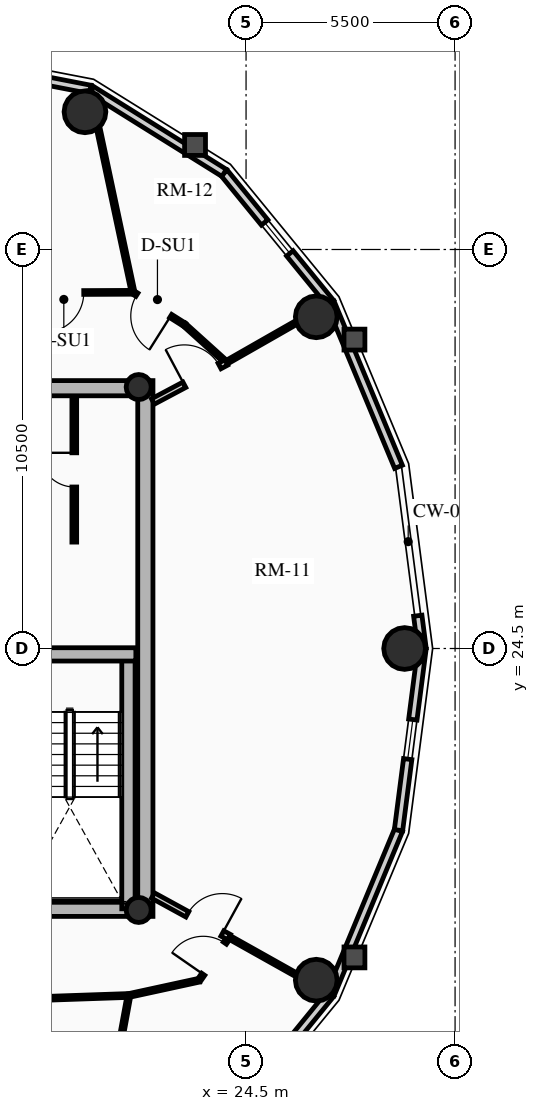
"""IFC4 building model, lengths in metres.
Left out: names, types, materials, properties, quantities, classifications, styles, units other than length and angle.
Written with IfcOpenShell. Run it as: python <this file> out.ifc"""

import sys

from ifc_helpers import new_model, si_unit, direction, frame, frame_2d, origin, origin_2d, place, context, subcontext, project, spatial, rectangle, circle, hollow_circle, extrude, source, transform, mapped, element, fill, save


model = new_model("IFC4")
c1 = context("Model", 3, precision=1e-05, world=origin(), true_north=direction((0.0, 1.0)))
c2 = subcontext(c1, "Body", "Model", "MODEL_VIEW")
j1 = project(units=[si_unit("LENGTHUNIT", "METRE"), si_unit("PLANEANGLEUNIT", "RADIAN")], contexts=[c1])
p1 = place(None, origin())
s1 = spatial("IfcSite", under=j1, at=p1, CompositionType="ELEMENT")
p2 = place(p1, origin())
s2 = spatial("IfcBuilding", under=s1, at=p2, CompositionType="ELEMENT")
p3 = place(p2, frame((0.0, 0.0, 229.25)))
s3 = spatial("IfcBuildingStorey", under=s2, at=p3, CompositionType="ELEMENT", Elevation=229.25)
p4 = place(p3, frame((21.85, 17.45, 0.0), z_axis=(0.0, 0.0, 1.0), x_axis=(0.0, 1.0, 0.0)))
e1 = element("IfcWall", 1, at=p4, inside=s3, PredefinedType="SHEAR", context=c2, shape_type="SweptSolid", body=[
    extrude(rectangle(XDim=14.1, YDim=0.4, at=frame_2d((7.05, 0.0))), origin(), (0.0, 0.0, 1.0), 3.2),
])
p5 = place(p3, frame((11.15, 17.65, 0.0), z_axis=(0.0, 0.0, 1.0), x_axis=(1.0, 0.0, 0.0)))
e2 = element("IfcWall", 2, at=p5, inside=s3, PredefinedType="SHEAR", context=c2, shape_type="SweptSolid", body=[
    extrude(rectangle(XDim=10.7, YDim=0.4, at=frame_2d((5.35, 0.0))), origin(), (0.0, 0.0, 1.0), 3.2),
])
m1 = source(origin(), c2, "Body", "SweptSolid", [
    extrude(rectangle(XDim=1.5, YDim=2.02, at=frame_2d((0.75, 1.01))), frame((0.0, 0.21, 0.0), z_axis=(0.0, -1.0, 0.0), x_axis=(1.0, 0.0, 0.0)), (0.0, 0.0, 1.0), 0.42),
])
p6 = place(p5, frame((5.45, 0.0, 0.0)))
e3 = element("IfcOpeningElement", 3, at=p6, cuts=e2, PredefinedType="OPENING", context=c2, shape_type="MappedRepresentation", body=[
    mapped(m1, transform((0.0, 0.0, 0.0), x_axis=(1.0, 0.0, 0.0), y_axis=(0.0, 1.0, 0.0), z_axis=(0.0, 0.0, 1.0), scale=1.0)),
])
p7 = place(p3, frame((11.15, 31.35, 0.0), z_axis=(0.0, 0.0, 1.0), x_axis=(1.0, 0.0, 0.0)))
e4 = element("IfcWall", 4, at=p7, inside=s3, PredefinedType="SHEAR", context=c2, shape_type="SweptSolid", body=[
    extrude(rectangle(XDim=10.7, YDim=0.4, at=frame_2d((5.35, 0.0))), origin(), (0.0, 0.0, 1.0), 3.2),
])
p8 = place(p7, frame((4.6, 0.0, 0.0)))
e5 = element("IfcOpeningElement", 5, at=p8, cuts=e4, PredefinedType="OPENING", context=c2, shape_type="MappedRepresentation", body=[
    mapped(m1, transform((0.0, 0.0, 0.0), x_axis=(1.0, 0.0, 0.0), y_axis=(0.0, 1.0, 0.0), z_axis=(0.0, 0.0, 1.0), scale=1.0)),
])
p9 = place(p3, frame((21.405, 17.65, 0.0), z_axis=(0.0, 0.0, 1.0), x_axis=(0.0, 1.0, 0.0)))
e6 = element("IfcWall", 6, at=p9, inside=s3, PredefinedType="SHEAR", context=c2, shape_type="SweptSolid", body=[
    extrude(rectangle(XDim=6.695, YDim=0.35, at=frame_2d((3.348, 0.0))), origin(), (0.0, 0.0, 1.0), 3.2),
])
p10 = place(p3, frame((18.315, 24.345, 0.0), z_axis=(0.0, 0.0, 1.0), x_axis=(1.0, 0.0, 0.0)))
e7 = element("IfcWall", 7, at=p10, inside=s3, PredefinedType="SHEAR", context=c2, shape_type="SweptSolid", body=[
    extrude(rectangle(XDim=3.285, YDim=0.35, at=frame_2d((1.643, 0.0))), origin(), (0.0, 0.0, 1.0), 3.2),
])
for number, where, z_axis, x_axis in (
    (8, (21.675, 17.62, 0.0), (0.0, 0.0, 1.0), (1.0, 0.0, 0.0)),
    (9, (21.675, 31.38, 0.0), (0.0, 0.0, 1.0), (1.0, 0.0, 0.0)),
):
    element("IfcColumn", number, at=place(p3, frame(where, z_axis=z_axis, x_axis=x_axis)), inside=s3, PredefinedType="COLUMN", context=c2, shape_type="SweptSolid", body=[
        extrude(hollow_circle(Radius=0.33, WallThickness=0.025, at=origin_2d()), origin(), (0.0, 0.0, 1.0), 3.2),
    ])
for number, where, z_axis, x_axis in (
    (10, (28.672, 24.5, 0.0), (0.0, 0.0, 1.0), (1.0, 0.0, 0.0)),
    (11, (26.347, 33.229, 0.0), (0.0, 0.0, 1.0), (1.0, 0.0, 0.0)),
    (12, (20.261, 38.623, 0.0), (0.0, 0.0, 1.0), (1.0, 0.0, 0.0)),
    (13, (26.347, 15.771, 0.0), (0.0, 0.0, 1.0), (1.0, 0.0, 0.0)),
):
    element("IfcColumn", number, at=place(p3, frame(where, z_axis=z_axis, x_axis=x_axis)), inside=s3, PredefinedType="USERDEFINED", context=c2, shape_type="SweptSolid", body=[
        extrude(circle(Radius=0.55, at=origin_2d()), origin(), (0.0, 0.0, 1.0), 3.2),
    ])
p11 = place(p3, frame((29.018, 25.363, 0.0), z_axis=(0.0, 0.0, 1.0), x_axis=(0.128247365719, -0.991742211054, 0.0)))
e14 = element("IfcWall", 14, at=p11, inside=s3, PredefinedType="SOLIDWALL", context=c2, shape_type="SweptSolid", body=[
    extrude(rectangle(XDim=0.87, YDim=0.22, at=frame_2d((0.435, 0.0))), origin(), (0.0, 0.0, 1.0), 2.612),
])
p12 = place(p3, frame((26.718, 33.593, 0.0), z_axis=(0.0, 0.0, 1.0), x_axis=(0.384036305194, -0.923317993052, 0.0)))
e15 = element("IfcWall", 15, at=p12, inside=s3, PredefinedType="SOLIDWALL", context=c2, shape_type="SweptSolid", body=[
    extrude(rectangle(XDim=4.671, YDim=0.22, at=frame_2d((2.335, 0.0))), origin(), (0.0, 0.0, 1.0), 2.612),
])
p13 = place(p3, frame((23.924, 37.015, 0.0), z_axis=(0.0, 0.0, 1.0), x_axis=(0.632467166636, -0.774587169483, 0.0)))
e16 = element("IfcWall", 16, at=p13, inside=s3, PredefinedType="SOLIDWALL", context=c2, shape_type="SweptSolid", body=[
    extrude(rectangle(XDim=4.418, YDim=0.22, at=frame_2d((2.209, 0.0))), origin(), (0.0, 0.0, 1.0), 2.612),
])
m2 = source(origin(), c2, "Body", "SweptSolid", [
    extrude(rectangle(XDim=1.05, YDim=1.3, at=frame_2d((0.525, 0.65))), frame((0.0, 0.12, 0.0), z_axis=(0.0, -1.0, 0.0), x_axis=(1.0, 0.0, 0.0)), (0.0, 0.0, 1.0), 0.24),
])
p14 = place(p13, frame((1.684, 0.0, 0.65)))
e17 = element("IfcOpeningElement", 17, at=p14, cuts=e16, PredefinedType="OPENING", context=c2, shape_type="MappedRepresentation", body=[
    mapped(m2, transform((0.0, 0.0, 0.0), x_axis=(1.0, 0.0, 0.0), y_axis=(0.0, 1.0, 0.0), z_axis=(0.0, 0.0, 1.0), scale=1.0)),
])
p15 = place(p3, frame((20.403, 39.213, 0.0), z_axis=(0.0, 0.0, 1.0), x_axis=(0.848318713376, -0.529485939886, 0.0)))
e18 = element("IfcWall", 18, at=p15, inside=s3, PredefinedType="SOLIDWALL", context=c2, shape_type="SweptSolid", body=[
    extrude(rectangle(XDim=4.15, YDim=0.22, at=frame_2d((2.075, 0.0))), origin(), (0.0, 0.0, 1.0), 2.612),
])
p16 = place(p3, frame((16.5, 39.97, 0.0), z_axis=(0.0, 0.0, 1.0), x_axis=(0.981700307484, -0.190432419211, 0.0)))
e19 = element("IfcWall", 19, at=p16, inside=s3, PredefinedType="SOLIDWALL", context=c2, shape_type="SweptSolid", body=[
    extrude(rectangle(XDim=3.976, YDim=0.22, at=frame_2d((1.988, 0.0))), origin(), (0.0, 0.0, 1.0), 2.612),
])
p17 = place(p16, frame((1.463, 0.0, 0.65)))
e20 = element("IfcOpeningElement", 20, at=p17, cuts=e19, PredefinedType="OPENING", context=c2, shape_type="MappedRepresentation", body=[
    mapped(m2, transform((0.0, 0.0, 0.0), x_axis=(1.0, 0.0, 0.0), y_axis=(0.0, 1.0, 0.0), z_axis=(0.0, 0.0, 1.0), scale=1.0)),
])
p18 = place(p3, frame((26.718, 15.407, 0.0), z_axis=(0.0, 0.0, 1.0), x_axis=(-0.632467166636, -0.774587169483, 0.0)))
e21 = element("IfcWall", 21, at=p18, inside=s3, PredefinedType="SOLIDWALL", context=c2, shape_type="SweptSolid", body=[
    extrude(rectangle(XDim=4.418, YDim=0.22, at=frame_2d((2.209, 0.0))), origin(), (0.0, 0.0, 1.0), 2.612),
])
p19 = place(p18, frame((1.684, 0.0, 0.65)))
e22 = element("IfcOpeningElement", 22, at=p19, cuts=e21, PredefinedType="OPENING", context=c2, shape_type="MappedRepresentation", body=[
    mapped(m2, transform((0.0, 0.0, 0.0), x_axis=(1.0, 0.0, 0.0), y_axis=(0.0, 1.0, 0.0), z_axis=(0.0, 0.0, 1.0), scale=1.0)),
])
p20 = place(p3, frame((28.512, 19.719, 0.0), z_axis=(0.0, 0.0, 1.0), x_axis=(-0.384036305194, -0.923317993052, 0.0)))
e23 = element("IfcWall", 23, at=p20, inside=s3, PredefinedType="SOLIDWALL", context=c2, shape_type="SweptSolid", body=[
    extrude(rectangle(XDim=4.671, YDim=0.22, at=frame_2d((2.335, 0.0))), origin(), (0.0, 0.0, 1.0), 2.612),
])
p21 = place(p3, frame((29.13, 24.5, 0.0), z_axis=(0.0, 0.0, 1.0), x_axis=(-0.128241318541, -0.991742993027, 0.0)))
e24 = element("IfcWall", 24, at=p21, inside=s3, PredefinedType="SOLIDWALL", context=c2, shape_type="SweptSolid", body=[
    extrude(rectangle(XDim=4.82, YDim=0.22, at=frame_2d((2.41, 0.0))), origin(), (0.0, 0.0, 1.0), 2.612),
])
p22 = place(p21, frame((1.885, 0.0, 0.65)))
e25 = element("IfcOpeningElement", 25, at=p22, cuts=e24, PredefinedType="OPENING", context=c2, shape_type="MappedRepresentation", body=[
    mapped(m2, transform((0.0, 0.0, 0.0), x_axis=(1.0, 0.0, 0.0), y_axis=(0.0, 1.0, 0.0), z_axis=(0.0, 0.0, 1.0), scale=1.0)),
])
p23 = place(p3, frame((19.98, 27.3, 0.0), z_axis=(0.0, 0.0, 1.0), x_axis=(0.0, 1.0, 0.0)))
e26 = element("IfcWall", 26, at=p23, inside=s3, PredefinedType="PARTITIONING", context=c2, shape_type="SweptSolid", body=[
    extrude(rectangle(XDim=3.82, YDim=0.125, at=frame_2d((1.91, 0.0))), origin(), (0.0, 0.0, 1.0), 2.975),
])
m3 = source(origin(), c2, "Body", "SweptSolid", [
    extrude(rectangle(XDim=0.9, YDim=2.005, at=frame_2d((0.45, 1.002))), frame((0.0, 0.073, 0.0), z_axis=(0.0, -1.0, 0.0), x_axis=(1.0, 0.0, 0.0)), (0.0, 0.0, 1.0), 0.145),
])
p24 = place(p23, frame((1.45, 0.0, 0.0)))
e27 = element("IfcOpeningElement", 27, at=p24, cuts=e26, PredefinedType="OPENING", context=c2, shape_type="MappedRepresentation", body=[
    mapped(m3, transform((0.0, 0.0, 0.0), x_axis=(1.0, 0.0, 0.0), y_axis=(0.0, 1.0, 0.0), z_axis=(0.0, 0.0, 1.0), scale=1.0)),
])
p25 = place(p3, frame((23.98, 32.027, 0.0), z_axis=(0.0, 0.0, 1.0), x_axis=(-0.742353224332, 0.670008724065, 0.0)))
e28 = element("IfcWall", 28, at=p25, inside=s3, PredefinedType="MOVABLE", context=c2, shape_type="SweptSolid", body=[
    extrude(rectangle(XDim=1.485, YDim=0.1, at=frame_2d((0.742, 0.0))), origin(), (0.0, 0.0, 1.0), 2.612),
])
p26 = place(p3, frame((22.877, 33.022, 0.0), z_axis=(0.0, 0.0, 1.0), x_axis=(-0.845895608855, 0.533348496689, 0.0)))
e29 = element("IfcWall", 29, at=p26, inside=s3, PredefinedType="MOVABLE", context=c2, shape_type="SweptSolid", body=[
    extrude(rectangle(XDim=1.597, YDim=0.1, at=frame_2d((0.798, 0.0))), origin(), (0.0, 0.0, 1.0), 2.545),
])
m4 = source(origin(), c2, "Body", "SweptSolid", [
    extrude(rectangle(XDim=1.05, YDim=2.015, at=frame_2d((0.525, 1.007))), frame((0.0, 0.06, 0.0), z_axis=(0.0, -1.0, 0.0), x_axis=(1.0, 0.0, 0.0)), (0.0, 0.0, 1.0), 0.12),
])
p27 = place(p26, frame((0.427, 0.0, 0.0)))
e30 = element("IfcOpeningElement", 30, at=p27, cuts=e29, PredefinedType="OPENING", context=c2, shape_type="MappedRepresentation", body=[
    mapped(m4, transform((0.0, 0.0, 0.0), x_axis=(1.0, 0.0, 0.0), y_axis=(0.0, 1.0, 0.0), z_axis=(0.0, 0.0, 1.0), scale=1.0)),
])
p28 = place(p3, frame((21.527, 33.873, 0.0), z_axis=(0.0, 0.0, 1.0), x_axis=(-0.999991838845, -0.004040079574, 0.0)))
e31 = element("IfcWall", 31, at=p28, inside=s3, PredefinedType="MOVABLE", context=c2, shape_type="SweptSolid", body=[
    extrude(rectangle(XDim=3.384, YDim=0.1, at=frame_2d((1.692, 0.0))), origin(), (0.0, 0.0, 1.0), 2.612),
])
p29 = place(p28, frame((1.298, 0.0, 0.0)))
e32 = element("IfcOpeningElement", 32, at=p29, cuts=e31, PredefinedType="OPENING", context=c2, shape_type="MappedRepresentation", body=[
    mapped(m4, transform((0.0, 0.0, 0.0), x_axis=(1.0, 0.0, 0.0), y_axis=(0.0, 1.0, 0.0), z_axis=(0.0, 0.0, 1.0), scale=1.0)),
])
p30 = place(p3, frame((14.781, 15.141, 0.0), z_axis=(0.0, 0.0, 1.0), x_axis=(0.999407918707, 0.034406569513, 0.0)))
e33 = element("IfcWall", 33, at=p30, inside=s3, PredefinedType="MOVABLE", context=c2, shape_type="SweptSolid", body=[
    extrude(rectangle(XDim=6.642, YDim=0.1, at=frame_2d((3.321, 0.0))), origin(), (0.0, 0.0, 1.0), 2.545),
])
p31 = place(p30, frame((2.796, 0.0, 0.0)))
e34 = element("IfcOpeningElement", 34, at=p31, cuts=e33, PredefinedType="OPENING", context=c2, shape_type="MappedRepresentation", body=[
    mapped(m4, transform((0.0, 0.0, 0.0), x_axis=(1.0, 0.0, 0.0), y_axis=(0.0, 1.0, 0.0), z_axis=(0.0, 0.0, 1.0), scale=1.0)),
])
p32 = place(p3, frame((21.419, 15.369, 0.0), z_axis=(0.0, 0.0, 1.0), x_axis=(0.977192701953, 0.212354475464, 0.0)))
e35 = element("IfcWall", 35, at=p32, inside=s3, PredefinedType="MOVABLE", context=c2, shape_type="SweptSolid", body=[
    extrude(rectangle(XDim=1.888, YDim=0.1, at=frame_2d((0.944, 0.0))), origin(), (0.0, 0.0, 1.0), 2.545),
])
p33 = place(p3, frame((23.263, 15.77, 0.0), z_axis=(0.0, 0.0, 1.0), x_axis=(0.570743456919, 0.821128434768, 0.0)))
e36 = element("IfcWall", 36, at=p33, inside=s3, PredefinedType="MOVABLE", context=c2, shape_type="SweptSolid", body=[
    extrude(rectangle(XDim=1.382, YDim=0.1, at=frame_2d((0.691, 0.0))), origin(), (0.0, 0.0, 1.0), 2.612),
])
m5 = source(origin(), c2, "Body", "SweptSolid", [
    extrude(rectangle(XDim=1.0, YDim=2.015, at=frame_2d((0.5, 1.007))), frame((0.0, 0.06, 0.0), z_axis=(0.0, -1.0, 0.0), x_axis=(1.0, 0.0, 0.0)), (0.0, 0.0, 1.0), 0.12),
])
p34 = place(p33, frame((0.191, 0.0, 0.0)))
e37 = element("IfcOpeningElement", 37, at=p34, cuts=e36, PredefinedType="OPENING", context=c2, shape_type="MappedRepresentation", body=[
    mapped(m5, transform((0.0, 0.0, 0.0), x_axis=(1.0, 0.0, 0.0), y_axis=(0.0, 1.0, 0.0), z_axis=(0.0, 0.0, 1.0), scale=1.0)),
])
p35 = place(p3, frame((23.98, 32.027, 0.0), z_axis=(0.0, 0.0, 1.0), x_axis=(0.868372526378, 0.495912447345, 0.0)))
e38 = element("IfcWall", 38, at=p35, inside=s3, PredefinedType="MOVABLE", context=c2, shape_type="SweptSolid", body=[
    extrude(rectangle(XDim=3.135, YDim=0.1, at=frame_2d((1.567, 0.0))), origin(), (0.0, 0.0, 1.0), 2.612),
])
p36 = place(p3, frame((21.527, 33.873, 0.0), z_axis=(0.0, 0.0, 1.0), x_axis=(-0.207772326864, 0.97817721308, 0.0)))
e39 = element("IfcWall", 39, at=p36, inside=s3, PredefinedType="MOVABLE", context=c2, shape_type="SweptSolid", body=[
    extrude(rectangle(XDim=5.439, YDim=0.1, at=frame_2d((2.72, 0.0))), origin(), (0.0, 0.0, 1.0), 2.612),
])
p37 = place(p3, frame((21.419, 15.369, 0.0), z_axis=(0.0, 0.0, 1.0), x_axis=(-0.180685606423, -0.98354090491, 0.0)))
e40 = element("IfcWall", 40, at=p37, inside=s3, PredefinedType="MOVABLE", context=c2, shape_type="SweptSolid", body=[
    extrude(rectangle(XDim=5.656, YDim=0.1, at=frame_2d((2.828, 0.0))), origin(), (0.0, 0.0, 1.0), 2.612),
])
p38 = place(p3, frame((24.052, 16.905, 0.0), z_axis=(0.0, 0.0, 1.0), x_axis=(0.872220814965, -0.489112308106, 0.0)))
e41 = element("IfcWall", 41, at=p38, inside=s3, PredefinedType="MOVABLE", context=c2, shape_type="SweptSolid", body=[
    extrude(rectangle(XDim=3.038, YDim=0.1, at=frame_2d((1.519, 0.0))), origin(), (0.0, 0.0, 1.0), 2.612),
])
p39 = place(p3, frame((22.05, 31.0, 0.0), z_axis=(0.0, 0.0, 1.0), x_axis=(0.882791584709, 0.469764853908, 0.0)))
e42 = element("IfcWall", 42, at=p39, inside=s3, PredefinedType="PARTITIONING", context=c2, shape_type="SweptSolid", body=[
    extrude(rectangle(XDim=2.186, YDim=0.16, at=frame_2d((1.093, 0.0))), origin(), (0.0, 0.0, 1.0), 2.545),
])
m6 = source(origin(), c2, "Body", "SweptSolid", [
    extrude(rectangle(XDim=1.05, YDim=2.015, at=frame_2d((0.525, 1.007))), frame((0.0, 0.09, 0.0), z_axis=(0.0, -1.0, 0.0), x_axis=(1.0, 0.0, 0.0)), (0.0, 0.0, 1.0), 0.18),
])
p40 = place(p39, frame((0.936, 0.0, 0.0)))
e43 = element("IfcOpeningElement", 43, at=p40, cuts=e42, PredefinedType="OPENING", context=c2, shape_type="MappedRepresentation", body=[
    mapped(m6, transform((0.0, 0.0, 0.0), x_axis=(1.0, 0.0, 0.0), y_axis=(0.0, 1.0, 0.0), z_axis=(0.0, 0.0, 1.0), scale=1.0)),
])
p41 = place(p3, frame((22.05, 18.0, 0.0), z_axis=(0.0, 0.0, 1.0), x_axis=(0.877252891813, -0.480028503118, 0.0)))
e44 = element("IfcWall", 44, at=p41, inside=s3, PredefinedType="PARTITIONING", context=c2, shape_type="SweptSolid", body=[
    extrude(rectangle(XDim=2.282, YDim=0.16, at=frame_2d((1.141, 0.0))), origin(), (0.0, 0.0, 1.0), 2.545),
])
p42 = place(p41, frame((1.032, 0.0, 0.0)))
e45 = element("IfcOpeningElement", 45, at=p42, cuts=e44, PredefinedType="OPENING", context=c2, shape_type="MappedRepresentation", body=[
    mapped(m6, transform((0.0, 0.0, 0.0), x_axis=(1.0, 0.0, 0.0), y_axis=(0.0, 1.0, 0.0), z_axis=(0.0, 0.0, 1.0), scale=1.0)),
])
m7 = source(origin(), c2, "Body", "SweptSolid", [
    extrude(rectangle(XDim=1.05, YDim=1.3, at=frame_2d((0.525, 0.65))), frame((0.0, 0.03, 0.0), z_axis=(0.0, -1.0, 0.0), x_axis=(1.0, 0.0, 0.0)), (0.0, 0.0, 1.0), 0.06),
])
p43 = place(p14, origin())
e46 = element("IfcWindow", 46, at=p43, inside=s3, PartitioningType="SINGLE_PANEL", PredefinedType="WINDOW", context=c2, shape_type="MappedRepresentation", body=[
    mapped(m7, transform((0.0, 0.0, 0.0), x_axis=(1.0, 0.0, 0.0), y_axis=(0.0, 1.0, 0.0), z_axis=(0.0, 0.0, 1.0), scale=1.0)),
])
fill(e17, e46)
p44 = place(p22, origin())
e47 = element("IfcWindow", 47, at=p44, inside=s3, PartitioningType="SINGLE_PANEL", PredefinedType="WINDOW", context=c2, shape_type="MappedRepresentation", body=[
    mapped(m7, transform((0.0, 0.0, 0.0), x_axis=(1.0, 0.0, 0.0), y_axis=(0.0, 1.0, 0.0), z_axis=(0.0, 0.0, 1.0), scale=1.0)),
])
fill(e25, e47)
m8 = source(origin(), c2, "Body", "SweptSolid", [
    extrude(rectangle(XDim=0.9, YDim=2.005, at=frame_2d((0.45, 1.002))), frame((0.0, 0.025, 0.0), z_axis=(0.0, -1.0, 0.0), x_axis=(1.0, 0.0, 0.0)), (0.0, 0.0, 1.0), 0.05),
])
p45 = place(p24, origin())
e48 = element("IfcDoor", 48, at=p45, inside=s3, OperationType="SINGLE_SWING_RIGHT", PredefinedType="DOOR", context=c2, shape_type="MappedRepresentation", body=[
    mapped(m8, transform((0.0, 0.0, 0.0), x_axis=(1.0, 0.0, 0.0), y_axis=(0.0, 1.0, 0.0), z_axis=(0.0, 0.0, 1.0), scale=1.0)),
])
fill(e27, e48)
m9 = source(origin(), c2, "Body", "SweptSolid", [
    extrude(rectangle(XDim=1.05, YDim=2.015, at=frame_2d((0.525, 1.007))), frame((0.0, 0.025, 0.0), z_axis=(0.0, -1.0, 0.0), x_axis=(1.0, 0.0, 0.0)), (0.0, 0.0, 1.0), 0.05),
])
p46 = place(p40, origin())
e49 = element("IfcDoor", 49, at=p46, inside=s3, OperationType="SINGLE_SWING_LEFT", PredefinedType="DOOR", context=c2, shape_type="MappedRepresentation", body=[
    mapped(m9, transform((0.0, 0.0, 0.0), x_axis=(1.0, 0.0, 0.0), y_axis=(0.0, 1.0, 0.0), z_axis=(0.0, 0.0, 1.0), scale=1.0)),
])
fill(e43, e49)
p47 = place(p42, origin())
e50 = element("IfcDoor", 50, at=p47, inside=s3, OperationType="SINGLE_SWING_RIGHT", PredefinedType="DOOR", context=c2, shape_type="MappedRepresentation", body=[
    mapped(m9, transform((0.0, 0.0, 0.0), x_axis=(1.0, 0.0, 0.0), y_axis=(0.0, 1.0, 0.0), z_axis=(0.0, 0.0, 1.0), scale=1.0)),
])
fill(e45, e50)
p48 = place(p27, origin())
e51 = element("IfcDoor", 51, at=p48, inside=s3, OperationType="SINGLE_SWING_LEFT", PredefinedType="DOOR", context=c2, shape_type="MappedRepresentation", body=[
    mapped(m9, transform((0.0, 0.0, 0.0), x_axis=(1.0, 0.0, 0.0), y_axis=(0.0, 1.0, 0.0), z_axis=(0.0, 0.0, 1.0), scale=1.0)),
])
fill(e30, e51)
p49 = place(p29, origin())
e52 = element("IfcDoor", 52, at=p49, inside=s3, OperationType="SINGLE_SWING_RIGHT", PredefinedType="DOOR", context=c2, shape_type="MappedRepresentation", body=[
    mapped(m9, transform((0.0, 0.0, 0.0), x_axis=(1.0, 0.0, 0.0), y_axis=(0.0, 1.0, 0.0), z_axis=(0.0, 0.0, 1.0), scale=1.0)),
])
fill(e32, e52)
m10 = source(origin(), c2, "Body", "SweptSolid", [
    extrude(rectangle(XDim=1.0, YDim=2.015, at=frame_2d((0.5, 1.007))), frame((0.0, 0.025, 0.0), z_axis=(0.0, -1.0, 0.0), x_axis=(1.0, 0.0, 0.0)), (0.0, 0.0, 1.0), 0.05),
])
p50 = place(p34, origin())
e53 = element("IfcDoor", 53, at=p50, inside=s3, OperationType="SINGLE_SWING_LEFT", PredefinedType="DOOR", context=c2, shape_type="MappedRepresentation", body=[
    mapped(m10, transform((0.0, 0.0, 0.0), x_axis=(1.0, 0.0, 0.0), y_axis=(0.0, 1.0, 0.0), z_axis=(0.0, 0.0, 1.0), scale=1.0)),
])
fill(e37, e53)
save(model, sys.argv[1])
